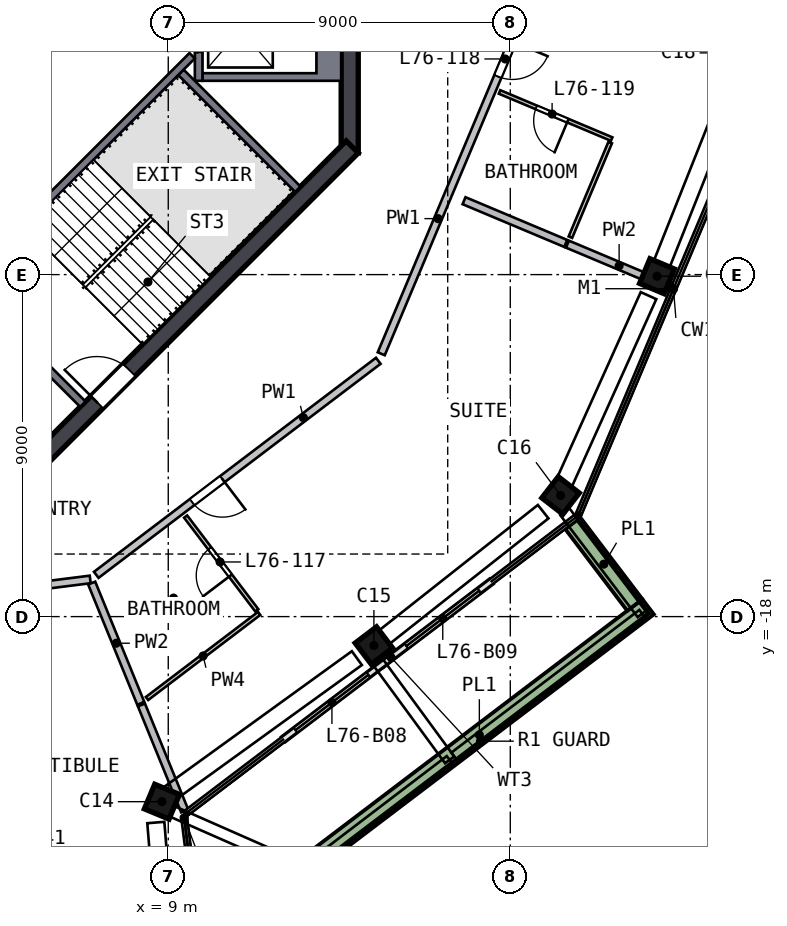
"""IFC4 building model, lengths in metres.
Left out: names, types, materials, properties, quantities, classifications, styles, units other than length and angle.
Written with IfcOpenShell. Run it as: python <this file> out.ifc"""

import sys

from ifc_helpers import new_model, si_unit, direction, frame, frame_2d, origin, origin_2d, place, context, subcontext, project, spatial, polyline, rectangle, outline, extrude, element, fill, save


model = new_model("IFC4")
c1 = context("Model", 3, precision=1e-05, world=origin(), true_north=direction((0.0, 1.0)))
c2 = subcontext(c1, "Body", "Model", "MODEL_VIEW")
j1 = project(units=[si_unit("LENGTHUNIT", "METRE"), si_unit("PLANEANGLEUNIT", "RADIAN")], contexts=[c1])
p1 = place(None, origin())
s1 = spatial("IfcSite", under=j1, at=p1, CompositionType="ELEMENT")
p2 = place(p1, origin())
s2 = spatial("IfcBuilding", under=s1, at=p2, CompositionType="ELEMENT")
p3 = place(p2, frame((0.0, 0.0, 306.5)))
s3 = spatial("IfcBuildingStorey", under=s2, at=p3, CompositionType="ELEMENT", Elevation=306.5)
p4 = place(p3, frame((8.701, -22.921, 0.0), z_axis=(0.108622054, 0.042339037, 0.993181079), x_axis=(-0.3795216, -0.921648084, 0.080797057)))
e1 = element("IfcColumn", 1, at=p4, inside=s3, PredefinedType="COLUMN", context=c2, shape_type="SweptSolid", body=[
    extrude(rectangle(XDim=0.7, YDim=0.7, at=origin_2d()), origin(), (0.0, 0.0, 1.0), 3.212),
])
p5 = place(p3, frame((14.304, -18.844, 0.0), z_axis=(0.089052954, 0.068747968, 0.993651492), x_axis=(0.791666534, 0.600506692, -0.112498053)))
e2 = element("IfcColumn", 2, at=p5, inside=s3, PredefinedType="COLUMN", context=c2, shape_type="SweptSolid", body=[
    extrude(rectangle(XDim=0.7, YDim=0.7, at=origin_2d()), origin(), (0.0, 0.0, 1.0), 3.21),
])
p6 = place(p3, frame((19.239, -14.923, 0.0), z_axis=(0.07016603, 0.092135676, 0.993271235), x_axis=(-0.608476364, -0.785076565, 0.11580717)))
e3 = element("IfcColumn", 3, at=p6, inside=s3, PredefinedType="COLUMN", context=c2, shape_type="SweptSolid", body=[
    extrude(rectangle(XDim=0.7, YDim=0.7, at=origin_2d()), origin(), (0.0, 0.0, 1.0), 3.212),
])
p7 = place(p3, frame((21.81, -9.168, 0.0), z_axis=(0.042739143, 0.104110118, 0.993647044), x_axis=(0.385137856, 0.915971714, -0.11253733)))
e4 = element("IfcColumn", 4, at=p7, inside=s3, PredefinedType="COLUMN", context=c2, shape_type="SweptSolid", body=[
    extrude(rectangle(XDim=0.7, YDim=0.7, at=origin_2d()), origin(), (0.0, 0.0, 1.0), 3.21),
])
p8 = place(p3, frame((13.775, -5.799, 0.0), z_axis=(0.0, 0.0, 1.0), x_axis=(0.0, 1.0, 0.0)))
e5 = element("IfcWall", 5, at=p8, inside=s3, PredefinedType="SHEAR", context=c2, shape_type="SweptSolid", body=[
    extrude(rectangle(XDim=11.598, YDim=0.45, at=frame_2d((5.799, 0.0))), origin(), (0.0, 0.0, 1.0), 3.5),
])
p9 = place(p8, frame((4.899, 0.0, 0.0)))
e6 = element("IfcOpeningElement", 6, at=p9, cuts=e5, PredefinedType="OPENING", context=c2, shape_type="SweptSolid", body=[
    extrude(rectangle(XDim=1.8, YDim=2.1, at=frame_2d((0.9, 1.05))), frame((0.0, 0.235, 0.0), z_axis=(0.0, -1.0, 0.0), x_axis=(1.0, 0.0, 0.0)), (0.0, 0.0, 1.0), 0.47),
])
p10 = place(p3, frame((5.64, -13.841, 0.0), z_axis=(0.0, 0.0, 1.0), x_axis=(0.707106781, 0.707106781, 0.0)))
e7 = element("IfcWall", 7, at=p10, inside=s3, PredefinedType="SHEAR", context=c2, shape_type="SweptSolid", body=[
    extrude(rectangle(XDim=11.598, YDim=0.45, at=frame_2d((5.799, 0.0))), origin(), (0.0, 0.0, 1.0), 3.5),
])
p11 = place(p10, frame((2.099, 0.0, 0.0)))
e8 = element("IfcOpeningElement", 8, at=p11, cuts=e7, PredefinedType="OPENING", context=c2, shape_type="SweptSolid", body=[
    extrude(rectangle(XDim=1.2, YDim=2.1, at=frame_2d((0.6, 1.05))), frame((0.0, 0.235, 0.0), z_axis=(0.0, -1.0, 0.0), x_axis=(1.0, 0.0, 0.0)), (0.0, 0.0, 1.0), 0.47),
])
p12 = place(p3, frame((12.032, -21.228, 0.0), z_axis=(0.0, 0.0, 1.0), x_axis=(0.796525363, 0.604605116, 0.0)))
e9 = element("IfcWall", 9, at=p12, inside=s3, PredefinedType="SOLIDWALL", context=c2, shape_type="SweptSolid", body=[
    extrude(rectangle(XDim=3.25, YDim=0.15, at=frame_2d((1.625, 0.0))), origin(), (0.0, 0.0, 1.0), 2.525),
])
p13 = place(p12, frame((0.4, 0.0, 0.0)))
e10 = element("IfcOpeningElement", 10, at=p13, cuts=e9, PredefinedType="OPENING", context=c2, shape_type="SweptSolid", body=[
    extrude(rectangle(XDim=2.4, YDim=2.4, at=frame_2d((1.2, 1.2))), frame((0.0, 0.085, 0.0), z_axis=(0.0, -1.0, 0.0), x_axis=(1.0, 0.0, 0.0)), (0.0, 0.0, 1.0), 0.17),
])
p14 = place(p3, frame((14.621, -19.263, 0.0), z_axis=(0.0, 0.0, 1.0), x_axis=(0.796530724, 0.604598053, 0.0)))
e11 = element("IfcWall", 11, at=p14, inside=s3, PredefinedType="SOLIDWALL", context=c2, shape_type="SweptSolid", body=[
    extrude(rectangle(XDim=3.611, YDim=0.15, at=frame_2d((1.806, 0.0))), origin(), (0.0, 0.0, 1.0), 2.525),
])
p15 = place(p14, frame((0.811, 0.0, 0.0)))
e12 = element("IfcOpeningElement", 12, at=p15, cuts=e11, PredefinedType="OPENING", context=c2, shape_type="SweptSolid", body=[
    extrude(rectangle(XDim=2.4, YDim=2.4, at=frame_2d((1.2, 1.2))), frame((0.0, 0.085, 0.0), z_axis=(0.0, -1.0, 0.0), x_axis=(1.0, 0.0, 0.0)), (0.0, 0.0, 1.0), 0.17),
])
p16 = place(p3, frame((12.744, -24.485, 0.0), z_axis=(0.0, 0.0, 1.0), x_axis=(0.796534949, 0.604592487, 0.0)))
e13 = element("IfcWall", 13, at=p16, inside=s3, PredefinedType="SOLIDWALL", context=c2, shape_type="SweptSolid", body=[
    extrude(rectangle(XDim=11.152, YDim=0.5, at=frame_2d((5.576, 0.0))), origin(), (0.0, 0.0, 1.0), 0.7),
])
p17 = place(p3, frame((21.277, -17.694, 0.0), z_axis=(0.0, 0.0, 1.0), x_axis=(-0.604592354, 0.79653505, 0.0)))
e14 = element("IfcWall", 14, at=p17, inside=s3, PredefinedType="SOLIDWALL", context=c2, shape_type="SweptSolid", body=[
    extrude(rectangle(XDim=2.699, YDim=0.5, at=frame_2d((1.35, 0.0))), origin(), (0.0, 0.0, 1.0), 0.7),
])
p18 = place(p3, origin())
e15 = element("IfcWall", 15, at=p18, inside=s3, PredefinedType="SOLIDWALL", context=c2, shape_type="SweptSolid", body=[
    extrude(outline(polyline([(13.55, -3.9), (9.9, -3.9), (9.9, -3.7), (12.9, -3.7), (12.9, -1.4), (9.9, -1.4), (9.9, -1.2), (13.55, -1.2), (13.55, -3.9)])), origin(), (0.0, 0.0, 1.0), 3.19),
])
p19 = place(p3, frame((9.8, -1.2, 0.0), z_axis=(0.0, 0.0, 1.0), x_axis=(0.0, -1.0, 0.0)))
e16 = element("IfcWall", 16, at=p19, inside=s3, PredefinedType="SOLIDWALL", context=c2, shape_type="SweptSolid", body=[
    extrude(rectangle(XDim=2.7, YDim=0.2, at=frame_2d((1.35, 0.0))), origin(), (0.0, 0.0, 1.0), 3.19),
])
p20 = place(p19, frame((0.75, 0.0, 0.0)))
e17 = element("IfcOpeningElement", 17, at=p20, cuts=e16, PredefinedType="OPENING", context=c2, shape_type="SweptSolid", body=[
    extrude(rectangle(XDim=1.2, YDim=2.1, at=frame_2d((0.6, 1.05))), frame((0.0, 0.11, 0.0), z_axis=(0.0, -1.0, 0.0), x_axis=(1.0, 0.0, 0.0)), (0.0, 0.0, 1.0), 0.22),
])
p21 = place(p3, frame((9.629, -3.24, 0.0), z_axis=(0.0, 0.0, 1.0), x_axis=(-0.707120946, -0.707092617, 0.0)))
e18 = element("IfcWall", 18, at=p21, inside=s3, PredefinedType="SOLIDWALL", context=c2, shape_type="SweptSolid", body=[
    extrude(rectangle(XDim=8.618, YDim=0.2, at=frame_2d((4.309, 0.0))), origin(), (0.0, 0.0, 1.0), 3.19),
])
p22 = place(p21, frame((7.018, 0.0, 0.0)))
e19 = element("IfcOpeningElement", 19, at=p22, cuts=e18, PredefinedType="OPENING", context=c2, shape_type="SweptSolid", body=[
    extrude(rectangle(XDim=1.2, YDim=2.1, at=frame_2d((0.6, 1.05))), frame((0.0, 0.11, 0.0), z_axis=(0.0, -1.0, 0.0), x_axis=(1.0, 0.0, 0.0)), (0.0, 0.0, 1.0), 0.22),
])
for number, where, z_axis, x_axis in (
    (20, (3.677, -9.334, 0.0), (0.0, 0.0, 1.0), (0.707, -0.707, 0.0)),
    (21, (9.334, -3.677, 0.0), (0.0, 0.0, 1.0), (0.707, -0.707, 0.0)),
):
    element("IfcWall", number, at=place(p3, frame(where, z_axis=z_axis, x_axis=x_axis)), inside=s3, PredefinedType="SOLIDWALL", context=c2, shape_type="SweptSolid", body=[
        extrude(rectangle(XDim=4.35, YDim=0.2, at=frame_2d((2.175, 0.0))), origin(), (0.0, 0.0, 1.0), 3.19),
    ])
p23 = place(p3, frame((6.947, -17.022, 0.0), z_axis=(0.0, 0.0, 1.0), x_axis=(-0.992114148, -0.125337611, 0.0)))
e22 = element("IfcWall", 22, at=p23, inside=s3, PredefinedType="SOLIDWALL", context=c2, shape_type="SweptSolid", body=[
    extrude(rectangle(XDim=9.317, YDim=0.2, at=frame_2d((4.658, 0.0))), origin(), (0.0, 0.0, 1.0), 3.19),
])
p24 = place(p23, frame((3.834, 0.0, 0.0)))
e23 = element("IfcOpeningElement", 23, at=p24, cuts=e22, PredefinedType="OPENING", context=c2, shape_type="SweptSolid", body=[
    extrude(rectangle(XDim=1.8, YDim=2.1, at=frame_2d((0.9, 1.05))), frame((0.0, 0.11, 0.0), z_axis=(0.0, -1.0, 0.0), x_axis=(1.0, 0.0, 0.0)), (0.0, 0.0, 1.0), 0.22),
])
p25 = place(p3, frame((14.526, -11.269, 0.0), z_axis=(0.0, 0.0, 1.0), x_axis=(-0.796533725, -0.604594099, 0.0)))
e24 = element("IfcWall", 24, at=p25, inside=s3, PredefinedType="SOLIDWALL", context=c2, shape_type="SweptSolid", body=[
    extrude(rectangle(XDim=9.316, YDim=0.2, at=frame_2d((4.658, 0.0))), origin(), (0.0, 0.0, 1.0), 3.19),
])
p26 = place(p25, frame((5.15, 0.0, 0.0)))
e25 = element("IfcOpeningElement", 25, at=p26, cuts=e24, PredefinedType="OPENING", context=c2, shape_type="SweptSolid", body=[
    extrude(rectangle(XDim=1.0, YDim=2.1, at=frame_2d((0.5, 1.05))), frame((0.0, 0.11, 0.0), z_axis=(0.0, -1.0, 0.0), x_axis=(1.0, 0.0, 0.0)), (0.0, 0.0, 1.0), 0.22),
])
p27 = place(p3, frame((18.137, -2.68, 0.0), z_axis=(0.0, 0.0, 1.0), x_axis=(-0.387519326, -0.92186158, 0.0)))
e26 = element("IfcWall", 26, at=p27, inside=s3, PredefinedType="SOLIDWALL", context=c2, shape_type="SweptSolid", body=[
    extrude(rectangle(XDim=9.115, YDim=0.2, at=frame_2d((4.558, 0.0))), origin(), (0.0, 0.0, 1.0), 3.19),
])
p28 = place(p27, frame((0.2, 0.0, 0.0)))
e27 = element("IfcOpeningElement", 27, at=p28, cuts=e26, PredefinedType="OPENING", context=c2, shape_type="SweptSolid", body=[
    extrude(rectangle(XDim=1.0, YDim=2.1, at=frame_2d((0.5, 1.05))), frame((0.0, 0.11, 0.0), z_axis=(0.0, -1.0, 0.0), x_axis=(1.0, 0.0, 0.0)), (0.0, 0.0, 1.0), 0.22),
])
p29 = place(p3, frame((6.986, -17.118, 0.0), z_axis=(0.0, 0.0, 1.0), x_axis=(0.377834523, -0.925873141, 0.0)))
e28 = element("IfcWall", 28, at=p29, inside=s3, PredefinedType="SOLIDWALL", context=c2, shape_type="SweptSolid", body=[
    extrude(rectangle(XDim=3.418, YDim=0.2, at=frame_2d((1.709, 0.0))), origin(), (0.0, 0.0, 1.0), 3.19),
])
p30 = place(p3, frame((8.295, -20.325, 0.0), z_axis=(0.0, 0.0, 1.0), x_axis=(0.377783538, -0.925893946, 0.0)))
e29 = element("IfcWall", 29, at=p30, inside=s3, PredefinedType="SOLIDWALL", context=c2, shape_type="SweptSolid", body=[
    extrude(rectangle(XDim=3.011, YDim=0.2, at=frame_2d((1.506, 0.0))), origin(), (0.0, 0.0, 1.0), 3.19),
])
p31 = place(p3, frame((16.783, -7.055, 0.0), z_axis=(0.0, 0.0, 1.0), x_axis=(0.921836194, -0.387579711, 0.0)))
e30 = element("IfcWall", 30, at=p31, inside=s3, PredefinedType="SOLIDWALL", context=c2, shape_type="SweptSolid", body=[
    extrude(rectangle(XDim=2.905, YDim=0.2, at=frame_2d((1.452, 0.0))), origin(), (0.0, 0.0, 1.0), 3.19),
])
p32 = place(p3, frame((19.503, -8.198, 0.0), z_axis=(0.0, 0.0, 1.0), x_axis=(0.92188582, -0.387461655, 0.0)))
e31 = element("IfcWall", 31, at=p32, inside=s3, PredefinedType="SOLIDWALL", context=c2, shape_type="SweptSolid", body=[
    extrude(rectangle(XDim=2.952, YDim=0.2, at=frame_2d((1.476, 0.0))), origin(), (0.0, 0.0, 1.0), 3.19),
])
p33 = place(p3, frame((11.392, -17.916, 0.0), z_axis=(0.0, 0.0, 1.0), x_axis=(-0.796506276, -0.604630261, 0.0)))
e32 = element("IfcWall", 32, at=p33, inside=s3, PredefinedType="PARTITIONING", context=c2, shape_type="SweptSolid", body=[
    extrude(rectangle(XDim=3.704, YDim=0.1, at=frame_2d((1.852, 0.0))), origin(), (0.0, 0.0, 1.0), 3.19),
])
p34 = place(p3, frame((11.331, -17.837, 0.0), z_axis=(0.0, 0.0, 1.0), x_axis=(-0.604601921, 0.796527788, 0.0)))
e33 = element("IfcWall", 33, at=p34, inside=s3, PredefinedType="PARTITIONING", context=c2, shape_type="SweptSolid", body=[
    extrude(rectangle(XDim=3.1, YDim=0.1, at=frame_2d((1.55, 0.0))), origin(), (0.0, 0.0, 1.0), 3.19),
])
p35 = place(p34, frame((1.15, 0.0, 0.0)))
e34 = element("IfcOpeningElement", 34, at=p35, cuts=e33, PredefinedType="OPENING", context=c2, shape_type="SweptSolid", body=[
    extrude(rectangle(XDim=0.9, YDim=2.1, at=frame_2d((0.45, 1.05))), frame((0.0, 0.06, 0.0), z_axis=(0.0, -1.0, 0.0), x_axis=(1.0, 0.0, 0.0)), (0.0, 0.0, 1.0), 0.12),
])
p36 = place(p3, frame((20.667, -5.434, 0.0), z_axis=(0.0, 0.0, 1.0), x_axis=(-0.92185784, 0.387528221, 0.0)))
e35 = element("IfcWall", 35, at=p36, inside=s3, PredefinedType="PARTITIONING", context=c2, shape_type="SweptSolid", body=[
    extrude(rectangle(XDim=3.2, YDim=0.1, at=frame_2d((1.6, 0.0))), origin(), (0.0, 0.0, 1.0), 3.19),
])
p37 = place(p36, frame((1.25, 0.0, 0.0)))
e36 = element("IfcOpeningElement", 36, at=p37, cuts=e35, PredefinedType="OPENING", context=c2, shape_type="SweptSolid", body=[
    extrude(rectangle(XDim=0.9, YDim=2.1, at=frame_2d((0.45, 1.05))), frame((0.0, 0.06, 0.0), z_axis=(0.0, -1.0, 0.0), x_axis=(1.0, 0.0, 0.0)), (0.0, 0.0, 1.0), 0.12),
])
p38 = place(p3, frame((20.629, -5.526, 0.0), z_axis=(0.0, 0.0, 1.0), x_axis=(-0.3875476, -0.921849693, 0.0)))
e37 = element("IfcWall", 37, at=p38, inside=s3, PredefinedType="PARTITIONING", context=c2, shape_type="SweptSolid", body=[
    extrude(rectangle(XDim=2.7, YDim=0.1, at=frame_2d((1.35, 0.0))), origin(), (0.0, 0.0, 1.0), 3.19),
])
p39 = place(p13, origin())
e38 = element("IfcDoor", 38, at=p39, inside=s3, OperationType="SLIDING_TO_RIGHT", PredefinedType="DOOR", context=c2, shape_type="SweptSolid", body=[
    extrude(rectangle(XDim=2.4, YDim=2.4, at=frame_2d((1.2, 1.2))), frame((0.0, 0.025, 0.0), z_axis=(0.0, -1.0, 0.0), x_axis=(1.0, 0.0, 0.0)), (0.0, 0.0, 1.0), 0.05),
])
fill(e10, e38)
p40 = place(p15, origin())
e39 = element("IfcDoor", 39, at=p40, inside=s3, OperationType="SLIDING_TO_LEFT", PredefinedType="DOOR", context=c2, shape_type="SweptSolid", body=[
    extrude(rectangle(XDim=2.4, YDim=2.4, at=frame_2d((1.2, 1.2))), frame((0.0, 0.025, 0.0), z_axis=(0.0, -1.0, 0.0), x_axis=(1.0, 0.0, 0.0)), (0.0, 0.0, 1.0), 0.05),
])
fill(e12, e39)
p41 = place(p11, origin())
e40 = element("IfcDoor", 40, at=p41, inside=s3, OperationType="SINGLE_SWING_LEFT", PredefinedType="DOOR", context=c2, shape_type="SweptSolid", body=[
    extrude(rectangle(XDim=1.2, YDim=2.1, at=frame_2d((0.6, 1.05))), frame((0.0, 0.025, 0.0), z_axis=(0.0, -1.0, 0.0), x_axis=(1.0, 0.0, 0.0)), (0.0, 0.0, 1.0), 0.05),
])
fill(e8, e40)
p42 = place(p26, origin())
e41 = element("IfcDoor", 41, at=p42, inside=s3, OperationType="SINGLE_SWING_LEFT", PredefinedType="DOOR", context=c2, shape_type="SweptSolid", body=[
    extrude(rectangle(XDim=1.0, YDim=2.1, at=frame_2d((0.5, 1.05))), frame((0.0, 0.025, 0.0), z_axis=(0.0, -1.0, 0.0), x_axis=(1.0, 0.0, 0.0)), (0.0, 0.0, 1.0), 0.05),
])
fill(e25, e41)
p43 = place(p35, origin())
e42 = element("IfcDoor", 42, at=p43, inside=s3, OperationType="SINGLE_SWING_LEFT", PredefinedType="DOOR", context=c2, shape_type="SweptSolid", body=[
    extrude(rectangle(XDim=0.9, YDim=2.1, at=frame_2d((0.45, 1.05))), frame((0.0, 0.025, 0.0), z_axis=(0.0, -1.0, 0.0), x_axis=(1.0, 0.0, 0.0)), (0.0, 0.0, 1.0), 0.05),
])
fill(e34, e42)
p44 = place(p28, origin())
e43 = element("IfcDoor", 43, at=p44, inside=s3, OperationType="SINGLE_SWING_LEFT", PredefinedType="DOOR", context=c2, shape_type="SweptSolid", body=[
    extrude(rectangle(XDim=1.0, YDim=2.1, at=frame_2d((0.5, 1.05))), frame((0.0, 0.025, 0.0), z_axis=(0.0, -1.0, 0.0), x_axis=(1.0, 0.0, 0.0)), (0.0, 0.0, 1.0), 0.05),
])
fill(e27, e43)
p45 = place(p37, origin())
e44 = element("IfcDoor", 44, at=p45, inside=s3, OperationType="SINGLE_SWING_LEFT", PredefinedType="DOOR", context=c2, shape_type="SweptSolid", body=[
    extrude(rectangle(XDim=0.9, YDim=2.1, at=frame_2d((0.45, 1.05))), frame((0.0, 0.025, 0.0), z_axis=(0.0, -1.0, 0.0), x_axis=(1.0, 0.0, 0.0)), (0.0, 0.0, 1.0), 0.05),
])
fill(e36, e44)
save(model, sys.argv[1])
